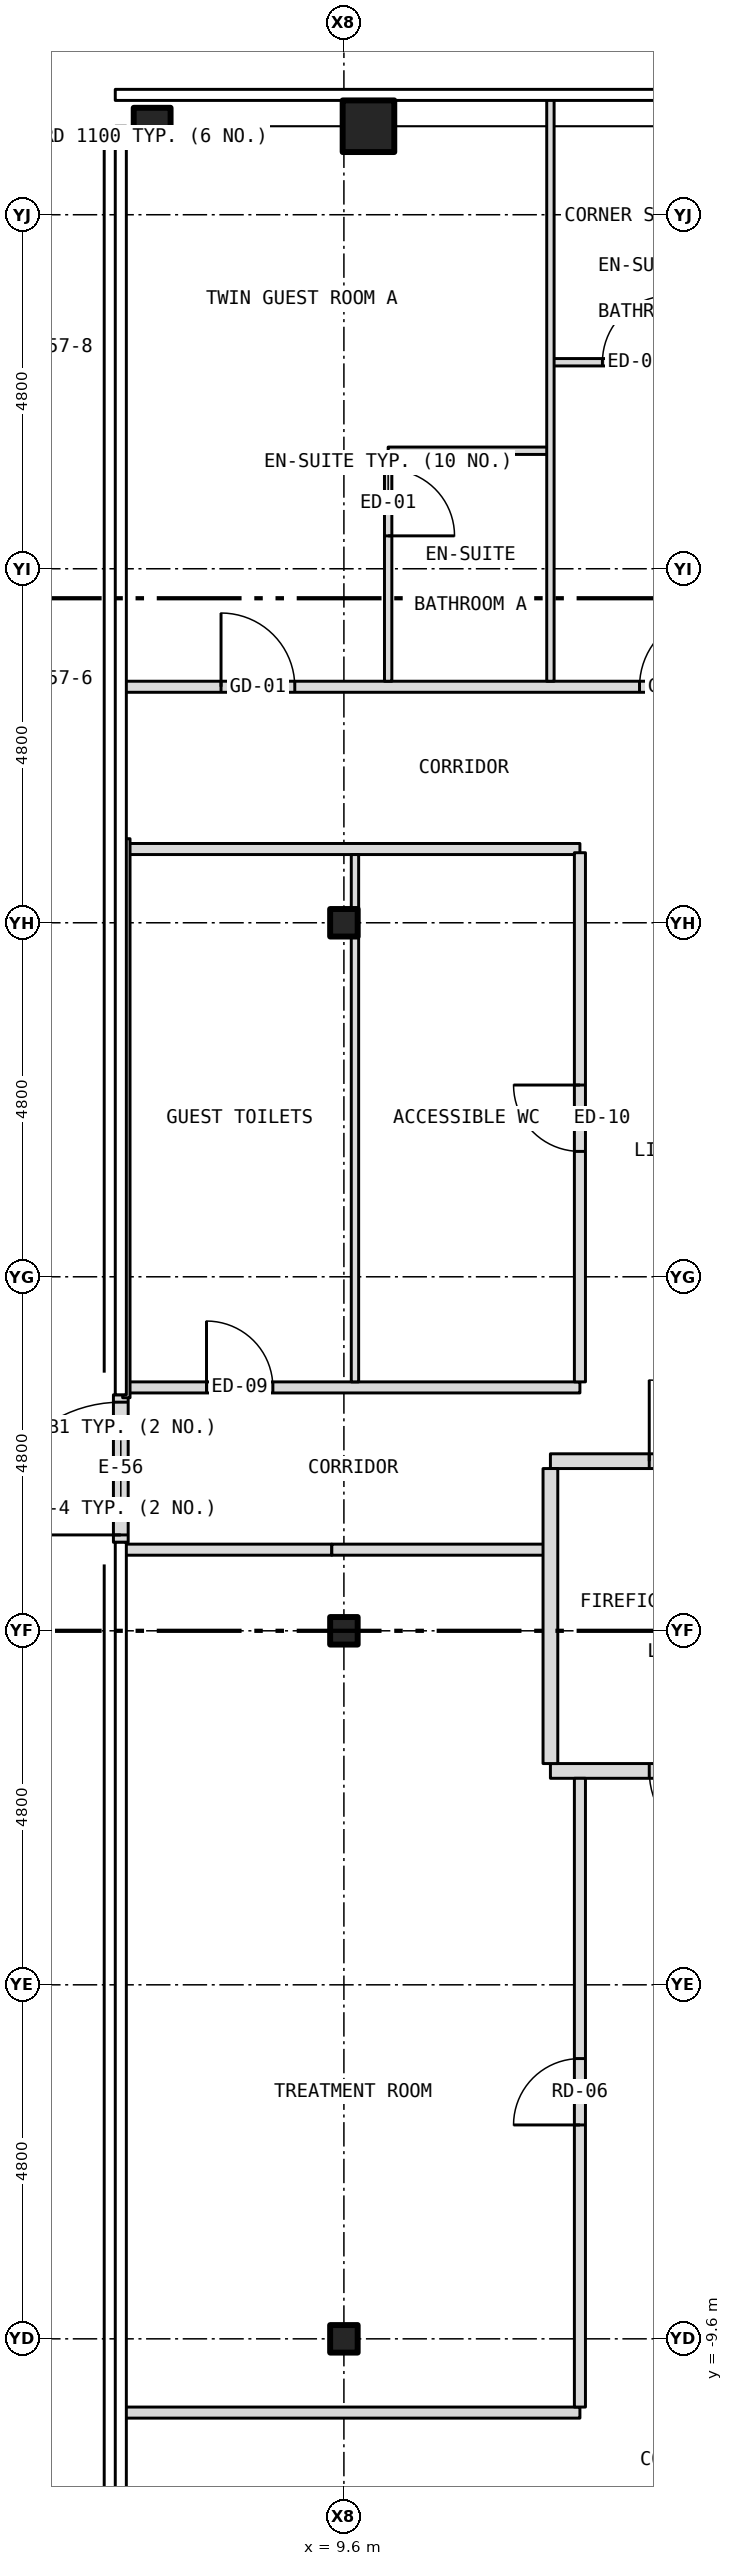
"""IFC4 building model, lengths in metres.
Left out: names, types, materials, properties, quantities, classifications, styles, units other than length and angle.
Written with IfcOpenShell. Run it as: python <this file> out.ifc"""

import sys

from ifc_helpers import new_model, si_unit, direction, frame, frame_2d, origin, origin_2d, place, context, subcontext, project, spatial, rectangle, hollow_rectangle, i_section, extrude, element, fill, save


model = new_model("IFC4")
c1 = context("Model", 3, precision=1e-05, world=origin(), true_north=direction((0.0, 1.0)))
c2 = subcontext(c1, "Body", "Model", "MODEL_VIEW")
j1 = project(units=[si_unit("LENGTHUNIT", "METRE"), si_unit("PLANEANGLEUNIT", "RADIAN")], contexts=[c1])
p1 = place(None, origin())
s1 = spatial("IfcSite", under=j1, at=p1, CompositionType="ELEMENT")
p2 = place(p1, origin())
s2 = spatial("IfcBuilding", under=s1, at=p2, CompositionType="ELEMENT")
p3 = place(p2, frame((0.0, 0.0, 219.0)))
s3 = spatial("IfcBuildingStorey", under=s2, at=p3, CompositionType="ELEMENT", Elevation=219.0)
p4 = place(p3, frame((9.933, 20.4, -0.15), z_axis=(0.0, 0.0, 1.0), x_axis=(1.0, 0.0, 0.0)))
e1 = element("IfcColumn", 1, at=p4, inside=s3, PredefinedType="COLUMN", context=c2, shape_type="SweptSolid", body=[
    extrude(hollow_rectangle(XDim=0.7, YDim=0.7, WallThickness=0.04, at=origin_2d()), origin(), (0.0, 0.0, 1.0), 3.5),
])
p5 = place(p3, frame((7.0, 20.4, -0.15), z_axis=(0.0, 0.0, 1.0), x_axis=(1.0, 0.0, 0.0)))
e2 = element("IfcColumn", 2, at=p5, inside=s3, PredefinedType="COLUMN", context=c2, shape_type="SweptSolid", body=[
    extrude(hollow_rectangle(XDim=0.5, YDim=0.5, WallThickness=0.03, at=origin_2d()), origin(), (0.0, 0.0, 1.0), 3.5),
])
for number, where, z_axis, x_axis in (
    (3, (9.6, -9.6, -0.15), (0.0, 0.0, 1.0), (1.0, 0.0, 0.0)),
    (4, (9.6, 0.0, -0.15), (0.0, 0.0, 1.0), (1.0, 0.0, 0.0)),
    (5, (9.6, 9.6, -0.15), (0.0, 0.0, 1.0), (1.0, 0.0, 0.0)),
):
    element("IfcColumn", number, at=place(p3, frame(where, z_axis=z_axis, x_axis=x_axis)), inside=s3, PredefinedType="COLUMN", context=c2, shape_type="SweptSolid", body=[
        extrude(i_section(OverallWidth=0.373, OverallDepth=0.373, WebThickness=0.016, FlangeThickness=0.026, at=origin_2d()), origin(), (0.0, 0.0, 1.0), 3.5),
    ])
p6 = place(p3, frame((6.575, 1.2, 0.0), z_axis=(0.0, 0.0, 1.0), x_axis=(0.0, 1.0, 0.0)))
e6 = element("IfcWall", 6, at=p6, inside=s3, PredefinedType="SOLIDWALL", context=c2, shape_type="SweptSolid", body=[
    extrude(rectangle(XDim=2.0, YDim=0.2, at=frame_2d((1.0, 0.0))), origin(), (0.0, 0.0, 1.0), 2.593),
])
p7 = place(p6, frame((0.1, 0.0, 0.0)))
e7 = element("IfcOpeningElement", 7, at=p7, cuts=e6, PredefinedType="OPENING", context=c2, shape_type="SweptSolid", body=[
    extrude(rectangle(XDim=1.8, YDim=2.1, at=frame_2d((0.9, 1.05))), frame((0.0, 0.112, 0.0), z_axis=(0.0, -1.0, 0.0), x_axis=(1.0, 0.0, 0.0)), (0.0, 0.0, 1.0), 0.224),
])
p8 = place(p3, frame((6.62, -10.6, 0.0), z_axis=(0.0, 0.0, 1.0), x_axis=(1.0, 0.0, 0.0)))
e8 = element("IfcWall", 8, at=p8, inside=s3, PredefinedType="PARTITIONING", context=c2, shape_type="SweptSolid", body=[
    extrude(rectangle(XDim=6.18, YDim=0.15, at=frame_2d((3.09, 0.0))), origin(), (0.0, 0.0, 1.0), 3.35),
])
p9 = place(p3, frame((12.4, -1.9, 0.0), z_axis=(0.0, 0.0, 1.0), x_axis=(1.0, 0.0, 0.0)))
e9 = element("IfcWall", 9, at=p9, inside=s3, PredefinedType="PARTITIONING", context=c2, shape_type="SweptSolid", body=[
    extrude(rectangle(XDim=3.28, YDim=0.2, at=frame_2d((1.64, 0.0))), origin(), (0.0, 0.0, 1.0), 3.35),
])
p10 = place(p9, frame((1.34, 0.0, 0.0)))
e10 = element("IfcOpeningElement", 10, at=p10, cuts=e9, PredefinedType="OPENING", context=c2, shape_type="SweptSolid", body=[
    extrude(rectangle(XDim=1.1, YDim=2.1, at=frame_2d((0.55, 1.05))), frame((0.0, 0.112, 0.0), z_axis=(0.0, -1.0, 0.0), x_axis=(1.0, 0.0, 0.0)), (0.0, 0.0, 1.0), 0.224),
])
p11 = place(p3, frame((6.62, 1.1, 0.0), z_axis=(0.0, 0.0, 1.0), x_axis=(1.0, 0.0, 0.0)))
e11 = element("IfcWall", 11, at=p11, inside=s3, PredefinedType="PARTITIONING", context=c2, shape_type="SweptSolid", body=[
    extrude(rectangle(XDim=2.816, YDim=0.15, at=frame_2d((1.408, 0.0))), origin(), (0.0, 0.0, 1.0), 2.593),
])
p12 = place(p3, frame((9.436, 1.1, 0.0), z_axis=(0.0, 0.0, 1.0), x_axis=(1.0, 0.0, 0.0)))
e12 = element("IfcWall", 12, at=p12, inside=s3, PredefinedType="PARTITIONING", context=c2, shape_type="SweptSolid", body=[
    extrude(rectangle(XDim=2.964, YDim=0.15, at=frame_2d((1.482, 0.0))), origin(), (0.0, 0.0, 1.0), 3.35),
])
p13 = place(p3, frame((12.4, 2.3, 0.0), z_axis=(0.0, 0.0, 1.0), x_axis=(1.0, 0.0, 0.0)))
e13 = element("IfcWall", 13, at=p13, inside=s3, PredefinedType="PARTITIONING", context=c2, shape_type="SweptSolid", body=[
    extrude(rectangle(XDim=3.28, YDim=0.2, at=frame_2d((1.64, 0.0))), origin(), (0.0, 0.0, 1.0), 3.35),
])
p14 = place(p13, frame((1.34, 0.0, 0.0)))
e14 = element("IfcOpeningElement", 14, at=p14, cuts=e13, PredefinedType="OPENING", context=c2, shape_type="SweptSolid", body=[
    extrude(rectangle(XDim=1.1, YDim=2.1, at=frame_2d((0.55, 1.05))), frame((0.0, 0.112, 0.0), z_axis=(0.0, -1.0, 0.0), x_axis=(1.0, 0.0, 0.0)), (0.0, 0.0, 1.0), 0.224),
])
p15 = place(p3, frame((6.65, 3.3, 0.0), z_axis=(0.0, 0.0, 1.0), x_axis=(1.0, 0.0, 0.0)))
e15 = element("IfcWall", 15, at=p15, inside=s3, PredefinedType="PARTITIONING", context=c2, shape_type="SweptSolid", body=[
    extrude(rectangle(XDim=6.15, YDim=0.15, at=frame_2d((3.075, 0.0))), origin(), (0.0, 0.0, 1.0), 3.35),
])
p16 = place(p15, frame((1.087, 0.0, 0.0)))
e16 = element("IfcOpeningElement", 16, at=p16, cuts=e15, PredefinedType="OPENING", context=c2, shape_type="SweptSolid", body=[
    extrude(rectangle(XDim=0.9, YDim=2.1, at=frame_2d((0.45, 1.05))), frame((0.0, 0.087, 0.0), z_axis=(0.0, -1.0, 0.0), x_axis=(1.0, 0.0, 0.0)), (0.0, 0.0, 1.0), 0.174),
])
p17 = place(p3, frame((6.65, 10.6, 0.0), z_axis=(0.0, 0.0, 1.0), x_axis=(1.0, 0.0, 0.0)))
e17 = element("IfcWall", 17, at=p17, inside=s3, PredefinedType="PARTITIONING", context=c2, shape_type="SweptSolid", body=[
    extrude(rectangle(XDim=6.15, YDim=0.15, at=frame_2d((3.075, 0.0))), origin(), (0.0, 0.0, 1.0), 3.35),
])
p18 = place(p3, frame((6.62, 12.8, 0.0), z_axis=(0.0, 0.0, 1.0), x_axis=(1.0, 0.0, 0.0)))
e18 = element("IfcWall", 18, at=p18, inside=s3, PredefinedType="PARTITIONING", context=c2, shape_type="SweptSolid", body=[
    extrude(rectangle(XDim=9.18, YDim=0.15, at=frame_2d((4.59, 0.0))), origin(), (0.0, 0.0, 1.0), 3.35),
])
p19 = place(p18, frame((1.314, 0.0, 0.0)))
e19 = element("IfcOpeningElement", 19, at=p19, cuts=e18, PredefinedType="OPENING", context=c2, shape_type="SweptSolid", body=[
    extrude(rectangle(XDim=1.0, YDim=2.1, at=frame_2d((0.5, 1.05))), frame((0.0, 0.087, 0.0), z_axis=(0.0, -1.0, 0.0), x_axis=(1.0, 0.0, 0.0)), (0.0, 0.0, 1.0), 0.174),
])
p20 = place(p18, frame((6.988, 0.0, 0.0)))
e20 = element("IfcOpeningElement", 20, at=p20, cuts=e18, PredefinedType="OPENING", context=c2, shape_type="SweptSolid", body=[
    extrude(rectangle(XDim=1.0, YDim=2.1, at=frame_2d((0.5, 1.05))), frame((0.0, 0.087, 0.0), z_axis=(0.0, -1.0, 0.0), x_axis=(1.0, 0.0, 0.0)), (0.0, 0.0, 1.0), 0.174),
])
p21 = place(p3, frame((10.2, 16.0, 0.0), z_axis=(0.0, 0.0, 1.0), x_axis=(1.0, 0.0, 0.0)))
e21 = element("IfcWall", 21, at=p21, inside=s3, PredefinedType="PARTITIONING", context=c2, shape_type="SweptSolid", body=[
    extrude(rectangle(XDim=2.2, YDim=0.1, at=frame_2d((1.1, 0.0))), origin(), (0.0, 0.0, 1.0), 3.35),
])
p22 = place(p3, frame((12.4, 17.2, 0.0), z_axis=(0.0, 0.0, 1.0), x_axis=(1.0, 0.0, 0.0)))
e22 = element("IfcWall", 22, at=p22, inside=s3, PredefinedType="PARTITIONING", context=c2, shape_type="SweptSolid", body=[
    extrude(rectangle(XDim=2.38, YDim=0.1, at=frame_2d((1.19, 0.0))), origin(), (0.0, 0.0, 1.0), 3.35),
])
p23 = place(p22, frame((0.705, 0.0, 0.0)))
e23 = element("IfcOpeningElement", 23, at=p23, cuts=e22, PredefinedType="OPENING", context=c2, shape_type="SweptSolid", body=[
    extrude(rectangle(XDim=0.9, YDim=2.1, at=frame_2d((0.45, 1.05))), frame((0.0, 0.062, 0.0), z_axis=(0.0, -1.0, 0.0), x_axis=(1.0, 0.0, 0.0)), (0.0, 0.0, 1.0), 0.124),
])
p24 = place(p3, frame((6.65, 3.16, 0.0), z_axis=(0.0, 0.0, 1.0), x_axis=(0.0, 1.0, 0.0)))
e24 = element("IfcWall", 24, at=p24, inside=s3, PredefinedType="PARTITIONING", context=c2, shape_type="SweptSolid", body=[
    extrude(rectangle(XDim=7.58, YDim=0.1, at=frame_2d((3.79, 0.0))), origin(), (0.0, 0.0, 1.0), 3.35),
])
p25 = place(p3, frame((9.75, 3.375, 0.0), z_axis=(0.0, 0.0, 1.0), x_axis=(0.0, 1.0, 0.0)))
e25 = element("IfcWall", 25, at=p25, inside=s3, PredefinedType="PARTITIONING", context=c2, shape_type="SweptSolid", body=[
    extrude(rectangle(XDim=6.038, YDim=0.1, at=frame_2d((3.019, 0.0))), origin(), (0.0, 0.0, 1.0), 2.728),
])
p26 = place(p3, frame((9.75, 9.413, 0.0), z_axis=(0.0, 0.0, 1.0), x_axis=(0.0, 1.0, 0.0)))
e26 = element("IfcWall", 26, at=p26, inside=s3, PredefinedType="PARTITIONING", context=c2, shape_type="SweptSolid", body=[
    extrude(rectangle(XDim=0.374, YDim=0.1, at=frame_2d((0.187, 0.0))), origin(), (0.0, 0.0, 1.0), 3.35),
])
p27 = place(p3, frame((9.75, 9.787, 0.0), z_axis=(0.0, 0.0, 1.0), x_axis=(0.0, 1.0, 0.0)))
e27 = element("IfcWall", 27, at=p27, inside=s3, PredefinedType="PARTITIONING", context=c2, shape_type="SweptSolid", body=[
    extrude(rectangle(XDim=0.738, YDim=0.1, at=frame_2d((0.369, 0.0))), origin(), (0.0, 0.0, 1.0), 2.728),
])
p28 = place(p3, frame((10.2, 12.875, 0.0), z_axis=(0.0, 0.0, 1.0), x_axis=(0.0, 1.0, 0.0)))
e28 = element("IfcWall", 28, at=p28, inside=s3, PredefinedType="PARTITIONING", context=c2, shape_type="SweptSolid", body=[
    extrude(rectangle(XDim=3.075, YDim=0.1, at=frame_2d((1.538, 0.0))), origin(), (0.0, 0.0, 1.0), 3.35),
])
p29 = place(p28, frame((1.971, 0.0, 0.0)))
e29 = element("IfcOpeningElement", 29, at=p29, cuts=e28, PredefinedType="OPENING", context=c2, shape_type="SweptSolid", body=[
    extrude(rectangle(XDim=0.9, YDim=2.1, at=frame_2d((0.45, 1.05))), frame((0.0, 0.062, 0.0), z_axis=(0.0, -1.0, 0.0), x_axis=(1.0, 0.0, 0.0)), (0.0, 0.0, 1.0), 0.124),
])
p30 = place(p3, frame((12.4, -1.8, 0.0), z_axis=(0.0, 0.0, 1.0), x_axis=(0.0, 1.0, 0.0)))
e30 = element("IfcWall", 30, at=p30, inside=s3, PredefinedType="PARTITIONING", context=c2, shape_type="SweptSolid", body=[
    extrude(rectangle(XDim=4.0, YDim=0.2, at=frame_2d((2.0, 0.0))), origin(), (0.0, 0.0, 1.0), 3.35),
])
p31 = place(p3, frame((12.4, 12.875, 0.0), z_axis=(0.0, 0.0, 1.0), x_axis=(0.0, 1.0, 0.0)))
e31 = element("IfcWall", 31, at=p31, inside=s3, PredefinedType="PARTITIONING", context=c2, shape_type="SweptSolid", body=[
    extrude(rectangle(XDim=7.905, YDim=0.1, at=frame_2d((3.953, 0.0))), origin(), (0.0, 0.0, 1.0), 3.35),
])
p32 = place(p3, frame((12.8, -10.525, 0.0), z_axis=(0.0, 0.0, 1.0), x_axis=(0.0, 1.0, 0.0)))
e32 = element("IfcWall", 32, at=p32, inside=s3, PredefinedType="PARTITIONING", context=c2, shape_type="SweptSolid", body=[
    extrude(rectangle(XDim=8.525, YDim=0.15, at=frame_2d((4.262, 0.0))), origin(), (0.0, 0.0, 1.0), 3.35),
])
p33 = place(p32, frame((3.825, 0.0, 0.0)))
e33 = element("IfcOpeningElement", 33, at=p33, cuts=e32, PredefinedType="OPENING", context=c2, shape_type="SweptSolid", body=[
    extrude(rectangle(XDim=0.9, YDim=2.1, at=frame_2d((0.45, 1.05))), frame((0.0, 0.087, 0.0), z_axis=(0.0, -1.0, 0.0), x_axis=(1.0, 0.0, 0.0)), (0.0, 0.0, 1.0), 0.174),
])
p34 = place(p3, frame((12.8, 3.375, 0.0), z_axis=(0.0, 0.0, 1.0), x_axis=(0.0, 1.0, 0.0)))
e34 = element("IfcWall", 34, at=p34, inside=s3, PredefinedType="PARTITIONING", context=c2, shape_type="SweptSolid", body=[
    extrude(rectangle(XDim=7.175, YDim=0.15, at=frame_2d((3.587, 0.0))), origin(), (0.0, 0.0, 1.0), 3.35),
])
p35 = place(p34, frame((3.125, 0.0, 0.0)))
e35 = element("IfcOpeningElement", 35, at=p35, cuts=e34, PredefinedType="OPENING", context=c2, shape_type="SweptSolid", body=[
    extrude(rectangle(XDim=0.9, YDim=2.1, at=frame_2d((0.45, 1.05))), frame((0.0, 0.087, 0.0), z_axis=(0.0, -1.0, 0.0), x_axis=(1.0, 0.0, 0.0)), (0.0, 0.0, 1.0), 0.174),
])
p36 = place(p7, origin())
e36 = element("IfcDoor", 36, at=p36, inside=s3, OperationType="DOUBLE_DOOR_DOUBLE_SWING", PredefinedType="DOOR", context=c2, shape_type="SweptSolid", body=[
    extrude(rectangle(XDim=1.8, YDim=2.1, at=frame_2d((0.9, 1.05))), frame((0.0, 0.025, 0.0), z_axis=(0.0, -1.0, 0.0), x_axis=(1.0, 0.0, 0.0)), (0.0, 0.0, 1.0), 0.05),
])
fill(e7, e36)
p37 = place(p14, origin())
e37 = element("IfcDoor", 37, at=p37, inside=s3, OperationType="SINGLE_SWING_LEFT", PredefinedType="DOOR", context=c2, shape_type="SweptSolid", body=[
    extrude(rectangle(XDim=1.1, YDim=2.1, at=frame_2d((0.55, 1.05))), frame((0.0, 0.025, 0.0), z_axis=(0.0, -1.0, 0.0), x_axis=(1.0, 0.0, 0.0)), (0.0, 0.0, 1.0), 0.05),
])
fill(e14, e37)
p38 = place(p10, origin())
e38 = element("IfcDoor", 38, at=p38, inside=s3, OperationType="SINGLE_SWING_RIGHT", PredefinedType="DOOR", context=c2, shape_type="SweptSolid", body=[
    extrude(rectangle(XDim=1.1, YDim=2.1, at=frame_2d((0.55, 1.05))), frame((0.0, 0.025, 0.0), z_axis=(0.0, -1.0, 0.0), x_axis=(1.0, 0.0, 0.0)), (0.0, 0.0, 1.0), 0.05),
])
fill(e10, e38)
p39 = place(p19, origin())
e39 = element("IfcDoor", 39, at=p39, inside=s3, OperationType="SINGLE_SWING_LEFT", PredefinedType="DOOR", context=c2, shape_type="SweptSolid", body=[
    extrude(rectangle(XDim=1.0, YDim=2.1, at=frame_2d((0.5, 1.05))), frame((0.0, 0.025, 0.0), z_axis=(0.0, -1.0, 0.0), x_axis=(1.0, 0.0, 0.0)), (0.0, 0.0, 1.0), 0.05),
])
fill(e19, e39)
p40 = place(p29, origin())
e40 = element("IfcDoor", 40, at=p40, inside=s3, OperationType="SINGLE_SWING_LEFT", PredefinedType="DOOR", context=c2, shape_type="SweptSolid", body=[
    extrude(rectangle(XDim=0.9, YDim=2.1, at=frame_2d((0.45, 1.05))), frame((0.0, 0.025, 0.0), z_axis=(0.0, -1.0, 0.0), x_axis=(1.0, 0.0, 0.0)), (0.0, 0.0, 1.0), 0.05),
])
fill(e29, e40)
p41 = place(p23, origin())
e41 = element("IfcDoor", 41, at=p41, inside=s3, OperationType="SINGLE_SWING_RIGHT", PredefinedType="DOOR", context=c2, shape_type="SweptSolid", body=[
    extrude(rectangle(XDim=0.9, YDim=2.1, at=frame_2d((0.45, 1.05))), frame((0.0, 0.025, 0.0), z_axis=(0.0, -1.0, 0.0), x_axis=(1.0, 0.0, 0.0)), (0.0, 0.0, 1.0), 0.05),
])
fill(e23, e41)
p42 = place(p20, origin())
e42 = element("IfcDoor", 42, at=p42, inside=s3, OperationType="SINGLE_SWING_RIGHT", PredefinedType="DOOR", context=c2, shape_type="SweptSolid", body=[
    extrude(rectangle(XDim=1.0, YDim=2.1, at=frame_2d((0.5, 1.05))), frame((0.0, 0.025, 0.0), z_axis=(0.0, -1.0, 0.0), x_axis=(1.0, 0.0, 0.0)), (0.0, 0.0, 1.0), 0.05),
])
fill(e20, e42)
p43 = place(p16, origin())
e43 = element("IfcDoor", 43, at=p43, inside=s3, OperationType="SINGLE_SWING_LEFT", PredefinedType="DOOR", context=c2, shape_type="SweptSolid", body=[
    extrude(rectangle(XDim=0.9, YDim=2.1, at=frame_2d((0.45, 1.05))), frame((0.0, 0.025, 0.0), z_axis=(0.0, -1.0, 0.0), x_axis=(1.0, 0.0, 0.0)), (0.0, 0.0, 1.0), 0.05),
])
fill(e16, e43)
p44 = place(p35, origin())
e44 = element("IfcDoor", 44, at=p44, inside=s3, OperationType="SINGLE_SWING_RIGHT", PredefinedType="DOOR", context=c2, shape_type="SweptSolid", body=[
    extrude(rectangle(XDim=0.9, YDim=2.1, at=frame_2d((0.45, 1.05))), frame((0.0, 0.025, 0.0), z_axis=(0.0, -1.0, 0.0), x_axis=(1.0, 0.0, 0.0)), (0.0, 0.0, 1.0), 0.05),
])
fill(e35, e44)
p45 = place(p33, origin())
e45 = element("IfcDoor", 45, at=p45, inside=s3, OperationType="SINGLE_SWING_LEFT", PredefinedType="DOOR", context=c2, shape_type="SweptSolid", body=[
    extrude(rectangle(XDim=0.9, YDim=2.1, at=frame_2d((0.45, 1.05))), frame((0.0, 0.025, 0.0), z_axis=(0.0, -1.0, 0.0), x_axis=(1.0, 0.0, 0.0)), (0.0, 0.0, 1.0), 0.05),
])
fill(e33, e45)
save(model, sys.argv[1])
